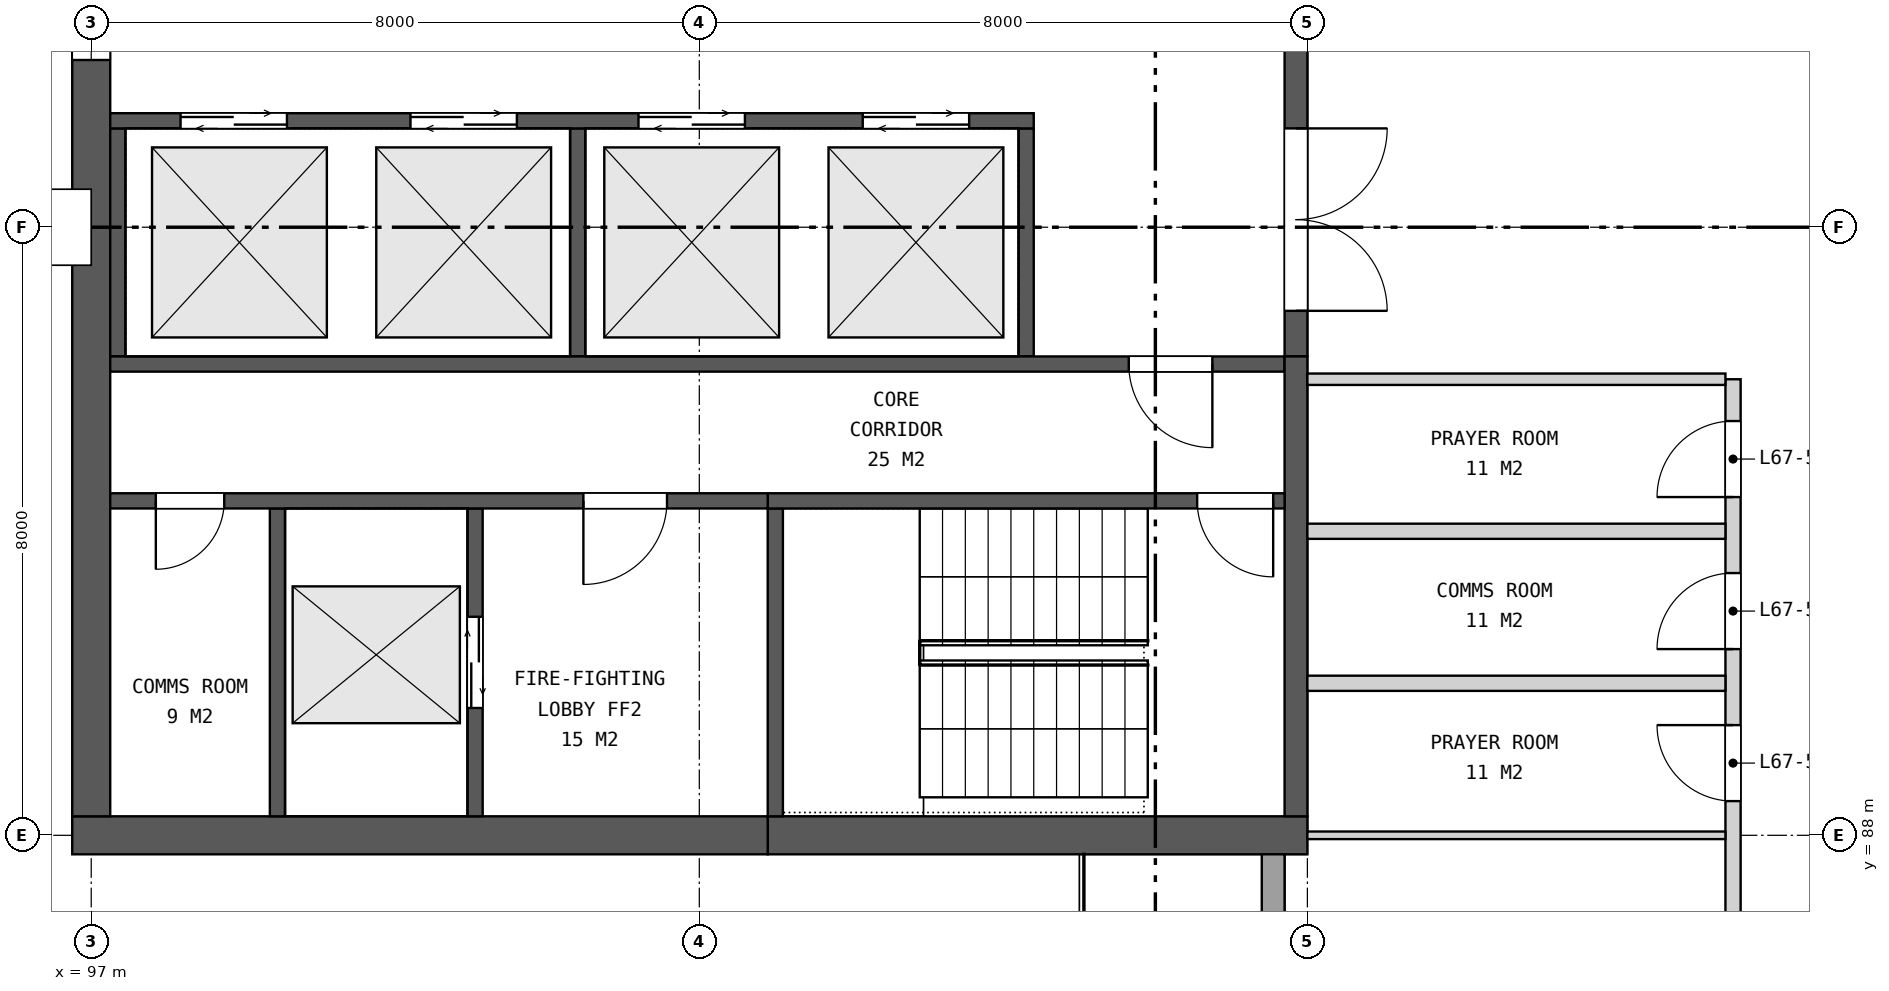
"""IFC4 building model, lengths in metres.
Left out: names, types, materials, properties, quantities, classifications, styles, units other than length and angle.
Written with IfcOpenShell. Run it as: python <this file> out.ifc"""

import sys

from ifc_helpers import new_model, si_unit, direction, frame, frame_2d, origin, place, context, subcontext, project, spatial, rectangle, extrude, element, fill, save


model = new_model("IFC4")
c1 = context("Model", 3, precision=1e-05, world=origin(), true_north=direction((0.0, 1.0)))
c2 = subcontext(c1, "Body", "Model", "MODEL_VIEW")
j1 = project(units=[si_unit("LENGTHUNIT", "METRE"), si_unit("PLANEANGLEUNIT", "RADIAN")], contexts=[c1])
p1 = place(None, origin())
s1 = spatial("IfcSite", under=j1, at=p1, CompositionType="ELEMENT")
p2 = place(p1, origin())
s2 = spatial("IfcBuilding", under=s1, at=p2, CompositionType="ELEMENT")
p3 = place(p2, frame((0.0, 0.0, 311.3)))
s3 = spatial("IfcBuildingStorey", under=s2, at=p3, CompositionType="ELEMENT", Elevation=311.3)
p4 = place(p3, frame((113.0, 88.0, 0.0), z_axis=(0.0, 0.0, 1.0), x_axis=(-1.0, 0.0, 0.0)))
e1 = element("IfcWall", 1, at=p4, inside=s3, PredefinedType="SHEAR", context=c2, shape_type="SweptSolid", body=[
    extrude(rectangle(XDim=7.1, YDim=0.5, at=frame_2d((3.55, 0.0))), origin(), (0.0, 0.0, 1.0), 4.2),
])
p5 = place(p3, frame((105.9, 88.0, 0.0), z_axis=(0.0, 0.0, 1.0), x_axis=(-1.0, 0.0, 0.0)))
e2 = element("IfcWall", 2, at=p5, inside=s3, PredefinedType="SHEAR", context=c2, shape_type="SweptSolid", body=[
    extrude(rectangle(XDim=9.15, YDim=0.5, at=frame_2d((4.575, 0.0))), origin(), (0.0, 0.0, 1.0), 4.2),
])
p6 = place(p3, frame((97.0, 111.75, 0.0), z_axis=(0.0, 0.0, 1.0), x_axis=(0.0, -1.0, 0.0)))
e3 = element("IfcWall", 3, at=p6, inside=s3, PredefinedType="SHEAR", context=c2, shape_type="SweptSolid", body=[
    extrude(rectangle(XDim=23.5, YDim=0.5, at=frame_2d((11.75, 0.0))), origin(), (0.0, 0.0, 1.0), 4.2),
])
p7 = place(p6, frame((9.95, 0.0, 0.15)))
e4 = element("IfcOpeningElement", 4, at=p7, cuts=e3, PredefinedType="OPENING", context=c2, shape_type="SweptSolid", body=[
    extrude(rectangle(XDim=3.6, YDim=3.0, at=frame_2d((1.8, 1.5))), frame((0.0, 0.26, 0.0), z_axis=(0.0, -1.0, 0.0), x_axis=(1.0, 0.0, 0.0)), (0.0, 0.0, 1.0), 0.52),
])
p8 = place(p3, frame((112.85, 105.7, 0.0), z_axis=(0.0, 0.0, 1.0), x_axis=(0.0, -1.0, 0.0)))
e5 = element("IfcWall", 5, at=p8, inside=s3, PredefinedType="SHEAR", context=c2, shape_type="SweptSolid", body=[
    extrude(rectangle(XDim=11.4, YDim=0.3, at=frame_2d((5.7, 0.0))), origin(), (0.0, 0.0, 1.0), 4.2),
])
p9 = place(p8, frame((0.6, 0.0, 0.0)))
e6 = element("IfcOpeningElement", 6, at=p9, cuts=e5, PredefinedType="OPENING", context=c2, shape_type="SweptSolid", body=[
    extrude(rectangle(XDim=2.4, YDim=2.4, at=frame_2d((1.2, 1.2))), frame((0.0, 0.16, 0.0), z_axis=(0.0, -1.0, 0.0), x_axis=(1.0, 0.0, 0.0)), (0.0, 0.0, 1.0), 0.32),
])
p10 = place(p8, frame((4.5, 0.0, 0.0)))
e7 = element("IfcOpeningElement", 7, at=p10, cuts=e5, PredefinedType="OPENING", context=c2, shape_type="SweptSolid", body=[
    extrude(rectangle(XDim=2.4, YDim=2.4, at=frame_2d((1.2, 1.2))), frame((0.0, 0.16, 0.0), z_axis=(0.0, -1.0, 0.0), x_axis=(1.0, 0.0, 0.0)), (0.0, 0.0, 1.0), 0.32),
])
p11 = place(p8, frame((8.4, 0.0, 0.0)))
e8 = element("IfcOpeningElement", 8, at=p11, cuts=e5, PredefinedType="OPENING", context=c2, shape_type="SweptSolid", body=[
    extrude(rectangle(XDim=2.4, YDim=2.4, at=frame_2d((1.2, 1.2))), frame((0.0, 0.16, 0.0), z_axis=(0.0, -1.0, 0.0), x_axis=(1.0, 0.0, 0.0)), (0.0, 0.0, 1.0), 0.32),
])
for number, where, z_axis, x_axis in (
    (9, (109.3, 97.3, 0.0), (0.0, 0.0, 1.0), (0.0, -1.0, 0.0)),
    (10, (103.4, 97.3, 0.0), (0.0, 0.0, 1.0), (0.0, -1.0, 0.0)),
    (11, (97.35, 97.3, 0.0), (0.0, 0.0, 1.0), (0.0, -1.0, 0.0)),
):
    element("IfcWall", number, at=place(p3, frame(where, z_axis=z_axis, x_axis=x_axis)), inside=s3, PredefinedType="SHEAR", context=c2, shape_type="SweptSolid", body=[
        extrude(rectangle(XDim=3.0, YDim=0.2, at=frame_2d((1.5, 0.0))), origin(), (0.0, 0.0, 1.0), 4.2),
    ])
p12 = place(p3, frame((109.4, 97.4, 0.0), z_axis=(0.0, 0.0, 1.0), x_axis=(-1.0, 0.0, 0.0)))
e12 = element("IfcWall", 12, at=p12, inside=s3, PredefinedType="SHEAR", context=c2, shape_type="SweptSolid", body=[
    extrude(rectangle(XDim=12.15, YDim=0.2, at=frame_2d((6.075, 0.0))), origin(), (0.0, 0.0, 1.0), 4.2),
])
p13 = place(p12, frame((0.85, 0.0, 0.0)))
e13 = element("IfcOpeningElement", 13, at=p13, cuts=e12, PredefinedType="OPENING", context=c2, shape_type="SweptSolid", body=[
    extrude(rectangle(XDim=1.4, YDim=2.1, at=frame_2d((0.7, 1.05))), frame((0.0, 0.11, 0.0), z_axis=(0.0, -1.0, 0.0), x_axis=(1.0, 0.0, 0.0)), (0.0, 0.0, 1.0), 0.22),
])
p14 = place(p12, frame((3.8, 0.0, 0.0)))
e14 = element("IfcOpeningElement", 14, at=p14, cuts=e12, PredefinedType="OPENING", context=c2, shape_type="SweptSolid", body=[
    extrude(rectangle(XDim=1.4, YDim=2.1, at=frame_2d((0.7, 1.05))), frame((0.0, 0.11, 0.0), z_axis=(0.0, -1.0, 0.0), x_axis=(1.0, 0.0, 0.0)), (0.0, 0.0, 1.0), 0.22),
])
p15 = place(p12, frame((6.8, 0.0, 0.0)))
e15 = element("IfcOpeningElement", 15, at=p15, cuts=e12, PredefinedType="OPENING", context=c2, shape_type="SweptSolid", body=[
    extrude(rectangle(XDim=1.4, YDim=2.1, at=frame_2d((0.7, 1.05))), frame((0.0, 0.11, 0.0), z_axis=(0.0, -1.0, 0.0), x_axis=(1.0, 0.0, 0.0)), (0.0, 0.0, 1.0), 0.22),
])
p16 = place(p12, frame((9.825, 0.0, 0.0)))
e16 = element("IfcOpeningElement", 16, at=p16, cuts=e12, PredefinedType="OPENING", context=c2, shape_type="SweptSolid", body=[
    extrude(rectangle(XDim=1.4, YDim=2.1, at=frame_2d((0.7, 1.05))), frame((0.0, 0.11, 0.0), z_axis=(0.0, -1.0, 0.0), x_axis=(1.0, 0.0, 0.0)), (0.0, 0.0, 1.0), 0.22),
])
p17 = place(p3, frame((112.7, 94.2, 0.0), z_axis=(0.0, 0.0, 1.0), x_axis=(-1.0, 0.0, 0.0)))
e17 = element("IfcWall", 17, at=p17, inside=s3, PredefinedType="SHEAR", context=c2, shape_type="SweptSolid", body=[
    extrude(rectangle(XDim=15.45, YDim=0.2, at=frame_2d((7.725, 0.0))), origin(), (0.0, 0.0, 1.0), 4.2),
])
p18 = place(p17, frame((0.95, 0.0, 0.0)))
e18 = element("IfcOpeningElement", 18, at=p18, cuts=e17, PredefinedType="OPENING", context=c2, shape_type="SweptSolid", body=[
    extrude(rectangle(XDim=1.1, YDim=2.1, at=frame_2d((0.55, 1.05))), frame((0.0, 0.11, 0.0), z_axis=(0.0, -1.0, 0.0), x_axis=(1.0, 0.0, 0.0)), (0.0, 0.0, 1.0), 0.22),
])
p19 = place(p3, frame((112.85, 94.3, 0.0), z_axis=(0.0, 0.0, 1.0), x_axis=(0.0, -1.0, 0.0)))
e19 = element("IfcWall", 19, at=p19, inside=s3, PredefinedType="SHEAR", context=c2, shape_type="SweptSolid", body=[
    extrude(rectangle(XDim=6.05, YDim=0.3, at=frame_2d((3.025, 0.0))), origin(), (0.0, 0.0, 1.0), 4.2),
])
p20 = place(p3, frame((106.0, 92.3, 0.0), z_axis=(0.0, 0.0, 1.0), x_axis=(0.0, -1.0, 0.0)))
e20 = element("IfcWall", 20, at=p20, inside=s3, PredefinedType="SHEAR", context=c2, shape_type="SweptSolid", body=[
    extrude(rectangle(XDim=4.05, YDim=0.2, at=frame_2d((2.025, 0.0))), origin(), (0.0, 0.0, 1.0), 4.2),
])
p21 = place(p3, frame((102.05, 92.3, 0.0), z_axis=(0.0, 0.0, 1.0), x_axis=(0.0, -1.0, 0.0)))
e21 = element("IfcWall", 21, at=p21, inside=s3, PredefinedType="SHEAR", context=c2, shape_type="SweptSolid", body=[
    extrude(rectangle(XDim=4.05, YDim=0.2, at=frame_2d((2.025, 0.0))), origin(), (0.0, 0.0, 1.0), 4.2),
])
p22 = place(p21, frame((1.425, 0.0, 0.0)))
e22 = element("IfcOpeningElement", 22, at=p22, cuts=e21, PredefinedType="OPENING", context=c2, shape_type="SweptSolid", body=[
    extrude(rectangle(XDim=1.2, YDim=2.1, at=frame_2d((0.6, 1.05))), frame((0.0, 0.11, 0.0), z_axis=(0.0, -1.0, 0.0), x_axis=(1.0, 0.0, 0.0)), (0.0, 0.0, 1.0), 0.22),
])
p23 = place(p3, frame((99.45, 92.3, 0.0), z_axis=(0.0, 0.0, 1.0), x_axis=(0.0, -1.0, 0.0)))
e23 = element("IfcWall", 23, at=p23, inside=s3, PredefinedType="SHEAR", context=c2, shape_type="SweptSolid", body=[
    extrude(rectangle(XDim=4.05, YDim=0.2, at=frame_2d((2.025, 0.0))), origin(), (0.0, 0.0, 1.0), 4.2),
])
p24 = place(p3, frame((112.7, 92.4, 0.0), z_axis=(0.0, 0.0, 1.0), x_axis=(-1.0, 0.0, 0.0)))
e24 = element("IfcWall", 24, at=p24, inside=s3, PredefinedType="SHEAR", context=c2, shape_type="SweptSolid", body=[
    extrude(rectangle(XDim=6.8, YDim=0.2, at=frame_2d((3.4, 0.0))), origin(), (0.0, 0.0, 1.0), 4.2),
])
p25 = place(p24, frame((0.15, 0.0, 0.0)))
e25 = element("IfcOpeningElement", 25, at=p25, cuts=e24, PredefinedType="OPENING", context=c2, shape_type="SweptSolid", body=[
    extrude(rectangle(XDim=1.0, YDim=2.1, at=frame_2d((0.5, 1.05))), frame((0.0, 0.11, 0.0), z_axis=(0.0, -1.0, 0.0), x_axis=(1.0, 0.0, 0.0)), (0.0, 0.0, 1.0), 0.22),
])
p26 = place(p3, frame((105.9, 92.4, 0.0), z_axis=(0.0, 0.0, 1.0), x_axis=(-1.0, 0.0, 0.0)))
e26 = element("IfcWall", 26, at=p26, inside=s3, PredefinedType="SHEAR", context=c2, shape_type="SweptSolid", body=[
    extrude(rectangle(XDim=8.65, YDim=0.2, at=frame_2d((4.325, 0.0))), origin(), (0.0, 0.0, 1.0), 4.2),
])
p27 = place(p26, frame((1.325, 0.0, 0.0)))
e27 = element("IfcOpeningElement", 27, at=p27, cuts=e26, PredefinedType="OPENING", context=c2, shape_type="SweptSolid", body=[
    extrude(rectangle(XDim=1.1, YDim=2.1, at=frame_2d((0.55, 1.05))), frame((0.0, 0.11, 0.0), z_axis=(0.0, -1.0, 0.0), x_axis=(1.0, 0.0, 0.0)), (0.0, 0.0, 1.0), 0.22),
])
p28 = place(p26, frame((7.15, 0.0, 0.0)))
e28 = element("IfcOpeningElement", 28, at=p28, cuts=e26, PredefinedType="OPENING", context=c2, shape_type="SweptSolid", body=[
    extrude(rectangle(XDim=0.9, YDim=2.1, at=frame_2d((0.45, 1.05))), frame((0.0, 0.11, 0.0), z_axis=(0.0, -1.0, 0.0), x_axis=(1.0, 0.0, 0.0)), (0.0, 0.0, 1.0), 0.22),
])
p29 = place(p3, frame((112.55, 87.75, 0.0), z_axis=(0.0, 0.0, 1.0), x_axis=(0.0, -1.0, 0.0)))
e29 = element("IfcWall", 29, at=p29, inside=s3, PredefinedType="SOLIDWALL", context=c2, shape_type="SweptSolid", body=[
    extrude(rectangle(XDim=7.715, YDim=0.3, at=frame_2d((3.857, 0.0))), origin(), (0.0, 0.0, 1.0), 3.544),
])
p30 = place(p29, frame((2.55, 0.0, 0.0)))
e30 = element("IfcOpeningElement", 30, at=p30, cuts=e29, PredefinedType="OPENING", context=c2, shape_type="SweptSolid", body=[
    extrude(rectangle(XDim=2.4, YDim=2.4, at=frame_2d((1.2, 1.2))), frame((0.0, 0.16, 0.0), z_axis=(0.0, -1.0, 0.0), x_axis=(1.0, 0.0, 0.0)), (0.0, 0.0, 1.0), 0.32),
])
p31 = place(p3, frame((118.6, 80.075, 0.0), z_axis=(0.0, 0.0, 1.0), x_axis=(0.0, 1.0, 0.0)))
e31 = element("IfcWall", 31, at=p31, inside=s3, PredefinedType="SOLIDWALL", context=c2, shape_type="SweptSolid", body=[
    extrude(rectangle(XDim=13.925, YDim=0.2, at=frame_2d((6.962, 0.0))), origin(), (0.0, 0.0, 1.0), 3.443),
])
p32 = place(p31, frame((12.375, 0.0, 0.0)))
e32 = element("IfcOpeningElement", 32, at=p32, cuts=e31, PredefinedType="OPENING", context=c2, shape_type="SweptSolid", body=[
    extrude(rectangle(XDim=1.0, YDim=2.1, at=frame_2d((0.5, 1.05))), frame((0.0, 0.11, 0.0), z_axis=(0.0, -1.0, 0.0), x_axis=(1.0, 0.0, 0.0)), (0.0, 0.0, 1.0), 0.22),
])
p33 = place(p31, frame((10.375, 0.0, 0.0)))
e33 = element("IfcOpeningElement", 33, at=p33, cuts=e31, PredefinedType="OPENING", context=c2, shape_type="SweptSolid", body=[
    extrude(rectangle(XDim=1.0, YDim=2.1, at=frame_2d((0.5, 1.05))), frame((0.0, 0.11, 0.0), z_axis=(0.0, -1.0, 0.0), x_axis=(1.0, 0.0, 0.0)), (0.0, 0.0, 1.0), 0.22),
])
p34 = place(p31, frame((8.375, 0.0, 0.0)))
e34 = element("IfcOpeningElement", 34, at=p34, cuts=e31, PredefinedType="OPENING", context=c2, shape_type="SweptSolid", body=[
    extrude(rectangle(XDim=1.0, YDim=2.1, at=frame_2d((0.5, 1.05))), frame((0.0, 0.11, 0.0), z_axis=(0.0, -1.0, 0.0), x_axis=(1.0, 0.0, 0.0)), (0.0, 0.0, 1.0), 0.22),
])
p35 = place(p31, frame((3.45, 0.0, 0.0)))
e35 = element("IfcOpeningElement", 35, at=p35, cuts=e31, PredefinedType="OPENING", context=c2, shape_type="SweptSolid", body=[
    extrude(rectangle(XDim=1.0, YDim=2.1, at=frame_2d((0.5, 1.05))), frame((0.0, 0.11, 0.0), z_axis=(0.0, -1.0, 0.0), x_axis=(1.0, 0.0, 0.0)), (0.0, 0.0, 1.0), 0.22),
])
p36 = place(p3, frame((113.0, 88.0, 0.0), z_axis=(0.0, 0.0, 1.0), x_axis=(1.0, 0.0, 0.0)))
e36 = element("IfcWall", 36, at=p36, inside=s3, PredefinedType="PARTITIONING", context=c2, shape_type="SweptSolid", body=[
    extrude(rectangle(XDim=5.5, YDim=0.1, at=frame_2d((2.75, 0.0))), origin(), (0.0, 0.0, 1.0), 3.443),
])
for number, where, z_axis, x_axis in (
    (37, (113.0, 90.0, 0.0), (0.0, 0.0, 1.0), (1.0, 0.0, 0.0)),
    (38, (113.0, 92.0, 0.0), (0.0, 0.0, 1.0), (1.0, 0.0, 0.0)),
):
    element("IfcWall", number, at=place(p3, frame(where, z_axis=z_axis, x_axis=x_axis)), inside=s3, PredefinedType="SOLIDWALL", context=c2, shape_type="SweptSolid", body=[
        extrude(rectangle(XDim=5.5, YDim=0.2, at=frame_2d((2.75, 0.0))), origin(), (0.0, 0.0, 1.0), 3.443),
    ])
p37 = place(p3, frame((113.0, 94.0, 0.0), z_axis=(0.0, 0.0, 1.0), x_axis=(1.0, 0.0, 0.0)))
e39 = element("IfcWall", 39, at=p37, inside=s3, PredefinedType="PARTITIONING", context=c2, shape_type="SweptSolid", body=[
    extrude(rectangle(XDim=5.5, YDim=0.15, at=frame_2d((2.75, 0.0))), origin(), (0.0, 0.0, 1.0), 3.443),
])
p38 = place(p7, origin())
e40 = element("IfcWindow", 40, at=p38, inside=s3, PartitioningType="SINGLE_PANEL", PredefinedType="WINDOW", context=c2, shape_type="SweptSolid", body=[
    extrude(rectangle(XDim=3.6, YDim=3.0, at=frame_2d((1.8, 1.5))), frame((0.0, 0.03, 0.0), z_axis=(0.0, -1.0, 0.0), x_axis=(1.0, 0.0, 0.0)), (0.0, 0.0, 1.0), 0.06),
])
fill(e4, e40)
p39 = place(p11, origin())
e41 = element("IfcDoor", 41, at=p39, inside=s3, OperationType="DOUBLE_DOOR_SINGLE_SWING", PredefinedType="DOOR", context=c2, shape_type="SweptSolid", body=[
    extrude(rectangle(XDim=2.4, YDim=2.4, at=frame_2d((1.2, 1.2))), frame((0.0, 0.025, 0.0), z_axis=(0.0, -1.0, 0.0), x_axis=(1.0, 0.0, 0.0)), (0.0, 0.0, 1.0), 0.05),
])
fill(e8, e41)
p40 = place(p13, origin())
e42 = element("IfcDoor", 42, at=p40, inside=s3, OperationType="DOUBLE_DOOR_SLIDING", PredefinedType="DOOR", context=c2, shape_type="SweptSolid", body=[
    extrude(rectangle(XDim=1.4, YDim=2.1, at=frame_2d((0.7, 1.05))), frame((0.0, 0.025, 0.0), z_axis=(0.0, -1.0, 0.0), x_axis=(1.0, 0.0, 0.0)), (0.0, 0.0, 1.0), 0.05),
])
fill(e13, e42)
p41 = place(p14, origin())
e43 = element("IfcDoor", 43, at=p41, inside=s3, OperationType="DOUBLE_DOOR_SLIDING", PredefinedType="DOOR", context=c2, shape_type="SweptSolid", body=[
    extrude(rectangle(XDim=1.4, YDim=2.1, at=frame_2d((0.7, 1.05))), frame((0.0, 0.025, 0.0), z_axis=(0.0, -1.0, 0.0), x_axis=(1.0, 0.0, 0.0)), (0.0, 0.0, 1.0), 0.05),
])
fill(e14, e43)
p42 = place(p15, origin())
e44 = element("IfcDoor", 44, at=p42, inside=s3, OperationType="DOUBLE_DOOR_SLIDING", PredefinedType="DOOR", context=c2, shape_type="SweptSolid", body=[
    extrude(rectangle(XDim=1.4, YDim=2.1, at=frame_2d((0.7, 1.05))), frame((0.0, 0.025, 0.0), z_axis=(0.0, -1.0, 0.0), x_axis=(1.0, 0.0, 0.0)), (0.0, 0.0, 1.0), 0.05),
])
fill(e15, e44)
p43 = place(p16, origin())
e45 = element("IfcDoor", 45, at=p43, inside=s3, OperationType="DOUBLE_DOOR_SLIDING", PredefinedType="DOOR", context=c2, shape_type="SweptSolid", body=[
    extrude(rectangle(XDim=1.4, YDim=2.1, at=frame_2d((0.7, 1.05))), frame((0.0, 0.025, 0.0), z_axis=(0.0, -1.0, 0.0), x_axis=(1.0, 0.0, 0.0)), (0.0, 0.0, 1.0), 0.05),
])
fill(e16, e45)
p44 = place(p18, origin())
e46 = element("IfcDoor", 46, at=p44, inside=s3, OperationType="SINGLE_SWING_LEFT", PredefinedType="DOOR", context=c2, shape_type="SweptSolid", body=[
    extrude(rectangle(XDim=1.1, YDim=2.1, at=frame_2d((0.55, 1.05))), frame((0.0, 0.025, 0.0), z_axis=(0.0, -1.0, 0.0), x_axis=(1.0, 0.0, 0.0)), (0.0, 0.0, 1.0), 0.05),
])
fill(e18, e46)
p45 = place(p22, origin())
e47 = element("IfcDoor", 47, at=p45, inside=s3, OperationType="DOUBLE_DOOR_SLIDING", PredefinedType="DOOR", context=c2, shape_type="SweptSolid", body=[
    extrude(rectangle(XDim=1.2, YDim=2.1, at=frame_2d((0.6, 1.05))), frame((0.0, 0.025, 0.0), z_axis=(0.0, -1.0, 0.0), x_axis=(1.0, 0.0, 0.0)), (0.0, 0.0, 1.0), 0.05),
])
fill(e22, e47)
p46 = place(p25, origin())
e48 = element("IfcDoor", 48, at=p46, inside=s3, OperationType="SINGLE_SWING_LEFT", PredefinedType="DOOR", context=c2, shape_type="SweptSolid", body=[
    extrude(rectangle(XDim=1.0, YDim=2.1, at=frame_2d((0.5, 1.05))), frame((0.0, 0.025, 0.0), z_axis=(0.0, -1.0, 0.0), x_axis=(1.0, 0.0, 0.0)), (0.0, 0.0, 1.0), 0.05),
])
fill(e25, e48)
p47 = place(p27, origin())
e49 = element("IfcDoor", 49, at=p47, inside=s3, OperationType="SINGLE_SWING_RIGHT", PredefinedType="DOOR", context=c2, shape_type="SweptSolid", body=[
    extrude(rectangle(XDim=1.1, YDim=2.1, at=frame_2d((0.55, 1.05))), frame((0.0, 0.025, 0.0), z_axis=(0.0, -1.0, 0.0), x_axis=(1.0, 0.0, 0.0)), (0.0, 0.0, 1.0), 0.05),
])
fill(e27, e49)
p48 = place(p28, origin())
e50 = element("IfcDoor", 50, at=p48, inside=s3, OperationType="SINGLE_SWING_RIGHT", PredefinedType="DOOR", context=c2, shape_type="SweptSolid", body=[
    extrude(rectangle(XDim=0.9, YDim=2.1, at=frame_2d((0.45, 1.05))), frame((0.0, 0.025, 0.0), z_axis=(0.0, -1.0, 0.0), x_axis=(1.0, 0.0, 0.0)), (0.0, 0.0, 1.0), 0.05),
])
fill(e28, e50)
p49 = place(p32, origin())
e51 = element("IfcDoor", 51, at=p49, inside=s3, OperationType="SINGLE_SWING_LEFT", PredefinedType="DOOR", context=c2, shape_type="SweptSolid", body=[
    extrude(rectangle(XDim=1.0, YDim=2.1, at=frame_2d((0.5, 1.05))), frame((0.0, 0.025, 0.0), z_axis=(0.0, -1.0, 0.0), x_axis=(1.0, 0.0, 0.0)), (0.0, 0.0, 1.0), 0.05),
])
fill(e32, e51)
p50 = place(p33, origin())
e52 = element("IfcDoor", 52, at=p50, inside=s3, OperationType="SINGLE_SWING_LEFT", PredefinedType="DOOR", context=c2, shape_type="SweptSolid", body=[
    extrude(rectangle(XDim=1.0, YDim=2.1, at=frame_2d((0.5, 1.05))), frame((0.0, 0.025, 0.0), z_axis=(0.0, -1.0, 0.0), x_axis=(1.0, 0.0, 0.0)), (0.0, 0.0, 1.0), 0.05),
])
fill(e33, e52)
p51 = place(p34, origin())
e53 = element("IfcDoor", 53, at=p51, inside=s3, OperationType="SINGLE_SWING_RIGHT", PredefinedType="DOOR", context=c2, shape_type="SweptSolid", body=[
    extrude(rectangle(XDim=1.0, YDim=2.1, at=frame_2d((0.5, 1.05))), frame((0.0, 0.025, 0.0), z_axis=(0.0, -1.0, 0.0), x_axis=(1.0, 0.0, 0.0)), (0.0, 0.0, 1.0), 0.05),
])
fill(e34, e53)
save(model, sys.argv[1])
